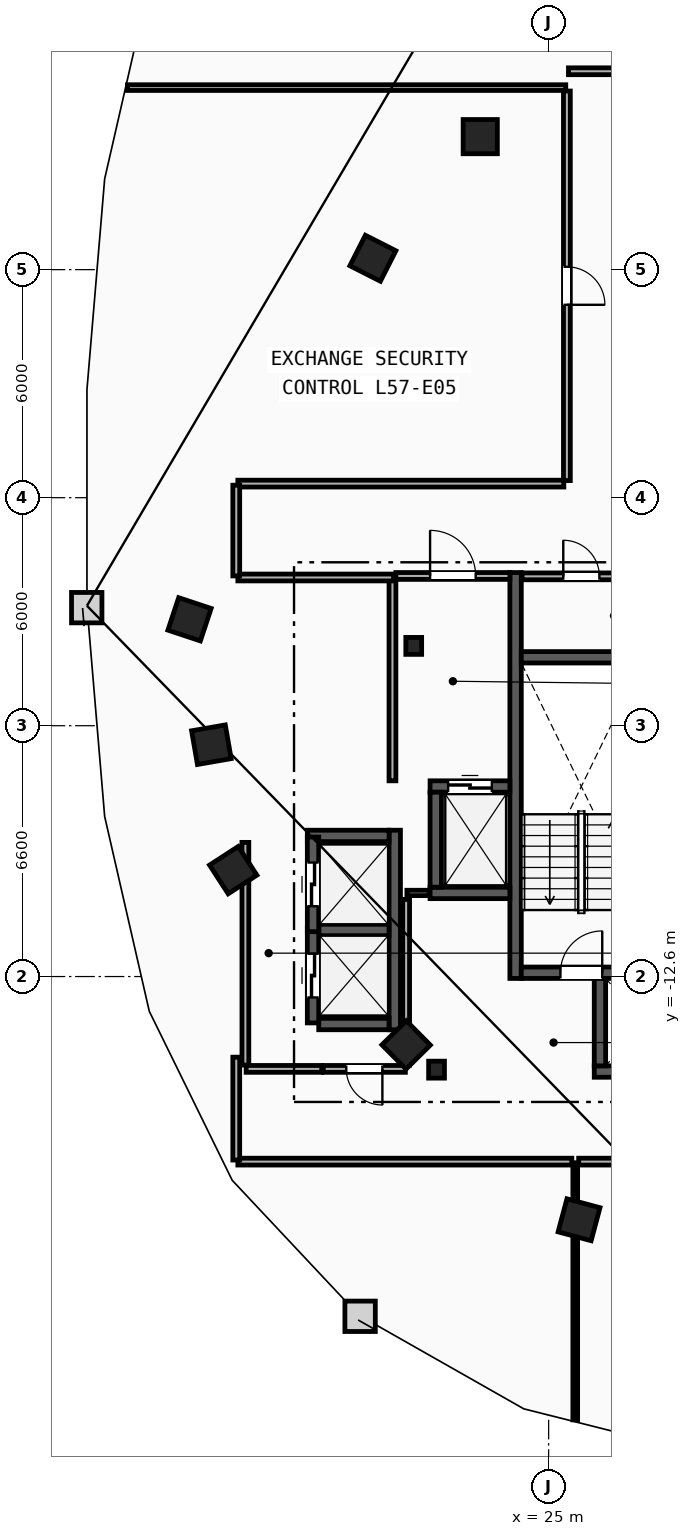
"""IFC4 building model, lengths in metres.
Left out: names, types, materials, properties, quantities, classifications, styles, units other than length and angle.
Written with IfcOpenShell. Run it as: python <this file> out.ifc"""

import sys

from ifc_helpers import new_model, si_unit, direction, frame, frame_2d, origin, origin_2d, place, context, subcontext, project, spatial, rectangle, i_section, extrude, element, fill, save


model = new_model("IFC4")
c1 = context("Model", 3, precision=1e-05, world=origin(), true_north=direction((0.0, 1.0)))
c2 = subcontext(c1, "Body", "Model", "MODEL_VIEW")
j1 = project(units=[si_unit("LENGTHUNIT", "METRE"), si_unit("PLANEANGLEUNIT", "RADIAN")], contexts=[c1])
p1 = place(None, origin())
s1 = spatial("IfcSite", under=j1, at=p1, CompositionType="ELEMENT")
p2 = place(p1, origin())
s2 = spatial("IfcBuilding", under=s1, at=p2, CompositionType="ELEMENT")
p3 = place(p2, frame((0.0, 0.0, 217.0)))
s3 = spatial("IfcBuildingStorey", under=s2, at=p3, CompositionType="ELEMENT", Elevation=217.0)
for number, where, z_axis, x_axis in (
    (1, (21.45, -3.9, 0.0), (0.0, 0.0, 1.0), (1.0, 0.0, 0.0)),
    (2, (22.05, -15.05, 0.0), (0.0, 0.0, 1.0), (1.0, 0.0, 0.0)),
):
    element("IfcColumn", number, at=place(p3, frame(where, z_axis=z_axis, x_axis=x_axis)), inside=s3, PredefinedType="COLUMN", context=c2, shape_type="SweptSolid", body=[
        extrude(i_section(OverallWidth=0.416, OverallDepth=0.446, WebThickness=0.039, FlangeThickness=0.063, FilletRadius=0.018, at=origin_2d()), origin(), (0.0, 0.0, 1.0), 3.6),
    ])
for number, where, z_axis, x_axis in (
    (3, (23.2, 9.5, 0.0), (0.0, 0.0, 1.0), (1.0, 0.0, 0.0)),
    (4, (15.55, -3.2, 0.0), (0.0, 0.0, 1.0), (-0.315, -0.949, 0.0)),
    (5, (16.125, -6.5, 0.0), (0.0, 0.0, 1.0), (0.172, -0.985, 0.0)),
    (6, (16.7, -9.8, 0.0), (0.0, 0.0, 1.0), (0.544, -0.839, 0.0)),
    (7, (21.25, -14.4, 0.0), (0.0, 0.0, 1.0), (0.703, -0.711, 0.0)),
    (8, (25.8, -19.0, 0.0), (0.0, 0.0, 1.0), (0.966, -0.259, 0.0)),
    (9, (20.375, 6.3, 0.0), (0.0, 0.0, 1.0), (-0.453, -0.892, 0.0)),
):
    element("IfcColumn", number, at=place(p3, frame(where, z_axis=z_axis, x_axis=x_axis)), inside=s3, PredefinedType="COLUMN", context=c2, shape_type="SweptSolid", body=[
        extrude(rectangle(XDim=0.9, YDim=0.9, at=origin_2d()), origin(), (0.0, 0.0, 1.0), 3.6),
    ])
p4 = place(p3, frame((24.13, -12.65, 0.0), z_axis=(0.0, 0.0, 1.0), x_axis=(0.0, 1.0, 0.0)))
e10 = element("IfcWall", 10, at=p4, inside=s3, PredefinedType="SHEAR", context=c2, shape_type="SweptSolid", body=[
    extrude(rectangle(XDim=10.68, YDim=0.3, at=frame_2d((5.34, 0.0))), origin(), (0.0, 0.0, 1.0), 3.34),
])
p5 = place(p3, frame((24.28, -12.5, 0.0), z_axis=(0.0, 0.0, 1.0), x_axis=(1.0, 0.0, 0.0)))
e11 = element("IfcWall", 11, at=p5, inside=s3, PredefinedType="SHEAR", context=c2, shape_type="SweptSolid", body=[
    extrude(rectangle(XDim=3.16, YDim=0.3, at=frame_2d((1.58, 0.0))), origin(), (0.0, 0.0, 1.0), 3.34),
])
p6 = place(p5, frame((1.03, 0.0, 0.0)))
e12 = element("IfcOpeningElement", 12, at=p6, cuts=e11, PredefinedType="OPENING", context=c2, shape_type="SweptSolid", body=[
    extrude(rectangle(XDim=1.1, YDim=2.15, at=frame_2d((0.55, 1.075))), frame((0.0, 0.16, 0.0), z_axis=(0.0, -1.0, 0.0), x_axis=(1.0, 0.0, 0.0)), (0.0, 0.0, 1.0), 0.32),
])
p7 = place(p3, frame((24.28, -4.2, 0.0), z_axis=(0.0, 0.0, 1.0), x_axis=(1.0, 0.0, 0.0)))
e13 = element("IfcWall", 13, at=p7, inside=s3, PredefinedType="SHEAR", context=c2, shape_type="SweptSolid", body=[
    extrude(rectangle(XDim=3.16, YDim=0.3, at=frame_2d((1.58, 0.0))), origin(), (0.0, 0.0, 1.0), 3.34),
])
p8 = place(p3, frame((20.89, -7.45, 0.0), z_axis=(0.0, 0.0, 1.0), x_axis=(0.0, 1.0, 0.0)))
e14 = element("IfcWall", 14, at=p8, inside=s3, PredefinedType="PARTITIONING", context=c2, shape_type="SweptSolid", body=[
    extrude(rectangle(XDim=5.3, YDim=0.18, at=frame_2d((2.65, 0.0))), origin(), (0.0, 0.0, 1.0), 3.34),
])
p9 = place(p3, frame((20.98, -2.06, 0.0), z_axis=(0.0, 0.0, 1.0), x_axis=(1.0, 0.0, 0.0)))
e15 = element("IfcWall", 15, at=p9, inside=s3, PredefinedType="PARTITIONING", context=c2, shape_type="SweptSolid", body=[
    extrude(rectangle(XDim=3.0, YDim=0.18, at=frame_2d((1.5, 0.0))), origin(), (0.0, 0.0, 1.0), 3.34),
])
p10 = place(p9, frame((0.9, 0.0, 0.0)))
e16 = element("IfcOpeningElement", 16, at=p10, cuts=e15, PredefinedType="OPENING", context=c2, shape_type="SweptSolid", body=[
    extrude(rectangle(XDim=1.2, YDim=2.15, at=frame_2d((0.6, 1.075))), frame((0.0, 0.1, 0.0), z_axis=(0.0, -1.0, 0.0), x_axis=(1.0, 0.0, 0.0)), (0.0, 0.0, 1.0), 0.2),
])
p11 = place(p3, frame((21.88, -7.6, 0.0), z_axis=(0.0, 0.0, 1.0), x_axis=(1.0, 0.0, 0.0)))
e17 = element("IfcWall", 17, at=p11, inside=s3, PredefinedType="SHEAR", context=c2, shape_type="SweptSolid", body=[
    extrude(rectangle(XDim=2.1, YDim=0.3, at=frame_2d((1.05, 0.0))), origin(), (0.0, 0.0, 1.0), 3.34),
])
p12 = place(p11, frame((0.475, 0.0, 0.0)))
e18 = element("IfcOpeningElement", 18, at=p12, cuts=e17, PredefinedType="OPENING", context=c2, shape_type="SweptSolid", body=[
    extrude(rectangle(XDim=1.15, YDim=2.2, at=frame_2d((0.575, 1.1))), frame((0.0, 0.16, 0.0), z_axis=(0.0, -1.0, 0.0), x_axis=(1.0, 0.0, 0.0)), (0.0, 0.0, 1.0), 0.32),
])
p13 = place(p3, frame((21.88, -10.4, 0.0), z_axis=(0.0, 0.0, 1.0), x_axis=(1.0, 0.0, 0.0)))
e19 = element("IfcWall", 19, at=p13, inside=s3, PredefinedType="SHEAR", context=c2, shape_type="SweptSolid", body=[
    extrude(rectangle(XDim=2.1, YDim=0.3, at=frame_2d((1.05, 0.0))), origin(), (0.0, 0.0, 1.0), 3.34),
])
for number, where, z_axis, x_axis in (
    (20, (22.03, -10.25, 0.0), (0.0, 0.0, 1.0), (0.0, 1.0, 0.0)),
    (21, (26.2, -15.1, 0.0), (0.0, 0.0, 1.0), (1.0, 0.0, 0.0)),
):
    element("IfcWall", number, at=place(p3, frame(where, z_axis=z_axis, x_axis=x_axis)), inside=s3, PredefinedType="SHEAR", context=c2, shape_type="SweptSolid", body=[
        extrude(rectangle(XDim=2.5, YDim=0.3, at=frame_2d((1.25, 0.0))), origin(), (0.0, 0.0, 1.0), 3.34),
    ])
p14 = place(p3, frame((26.35, -14.95, 0.0), z_axis=(0.0, 0.0, 1.0), x_axis=(0.0, 1.0, 0.0)))
e22 = element("IfcWall", 22, at=p14, inside=s3, PredefinedType="SHEAR", context=c2, shape_type="SweptSolid", body=[
    extrude(rectangle(XDim=2.3, YDim=0.3, at=frame_2d((1.15, 0.0))), origin(), (0.0, 0.0, 1.0), 3.34),
])
p15 = place(p3, frame((20.95, -14.0, 0.0), z_axis=(0.0, 0.0, 1.0), x_axis=(0.0, 1.0, 0.0)))
e23 = element("IfcWall", 23, at=p15, inside=s3, PredefinedType="SHEAR", context=c2, shape_type="SweptSolid", body=[
    extrude(rectangle(XDim=5.25, YDim=0.3, at=frame_2d((2.625, 0.0))), origin(), (0.0, 0.0, 1.0), 3.34),
])
p16 = place(p3, frame((18.95, -13.85, 0.0), z_axis=(0.0, 0.0, 1.0), x_axis=(1.0, 0.0, 0.0)))
e24 = element("IfcWall", 24, at=p16, inside=s3, PredefinedType="SHEAR", context=c2, shape_type="SweptSolid", body=[
    extrude(rectangle(XDim=1.85, YDim=0.3, at=frame_2d((0.925, 0.0))), origin(), (0.0, 0.0, 1.0), 3.34),
])
p17 = place(p3, frame((18.65, -8.9, 0.0), z_axis=(0.0, 0.0, 1.0), x_axis=(1.0, 0.0, 0.0)))
e25 = element("IfcWall", 25, at=p17, inside=s3, PredefinedType="SHEAR", context=c2, shape_type="SweptSolid", body=[
    extrude(rectangle(XDim=2.15, YDim=0.3, at=frame_2d((1.075, 0.0))), origin(), (0.0, 0.0, 1.0), 3.34),
])
p18 = place(p3, frame((18.95, -11.375, 0.0), z_axis=(0.0, 0.0, 1.0), x_axis=(1.0, 0.0, 0.0)))
e26 = element("IfcWall", 26, at=p18, inside=s3, PredefinedType="SHEAR", context=c2, shape_type="SweptSolid", body=[
    extrude(rectangle(XDim=1.85, YDim=0.3, at=frame_2d((0.925, 0.0))), origin(), (0.0, 0.0, 1.0), 3.34),
])
p19 = place(p3, frame((18.8, -13.82, 0.0), z_axis=(0.0, 0.0, 1.0), x_axis=(0.0, 1.0, 0.0)))
e27 = element("IfcWall", 27, at=p19, inside=s3, PredefinedType="SHEAR", context=c2, shape_type="SweptSolid", body=[
    extrude(rectangle(XDim=2.49, YDim=0.3, at=frame_2d((1.245, 0.0))), origin(), (0.0, 0.0, 1.0), 3.34),
])
p20 = place(p19, frame((0.67, 0.0, 0.0)))
e28 = element("IfcOpeningElement", 28, at=p20, cuts=e27, PredefinedType="OPENING", context=c2, shape_type="SweptSolid", body=[
    extrude(rectangle(XDim=1.15, YDim=2.2, at=frame_2d((0.575, 1.1))), frame((0.0, 0.16, 0.0), z_axis=(0.0, -1.0, 0.0), x_axis=(1.0, 0.0, 0.0)), (0.0, 0.0, 1.0), 0.32),
])
p21 = place(p3, frame((18.8, -11.42, 0.0), z_axis=(0.0, 0.0, 1.0), x_axis=(0.0, 1.0, 0.0)))
e29 = element("IfcWall", 29, at=p21, inside=s3, PredefinedType="SHEAR", context=c2, shape_type="SweptSolid", body=[
    extrude(rectangle(XDim=2.49, YDim=0.3, at=frame_2d((1.245, 0.0))), origin(), (0.0, 0.0, 1.0), 3.34),
])
p22 = place(p21, frame((0.67, 0.0, 0.0)))
e30 = element("IfcOpeningElement", 30, at=p22, cuts=e29, PredefinedType="OPENING", context=c2, shape_type="SweptSolid", body=[
    extrude(rectangle(XDim=1.15, YDim=2.2, at=frame_2d((0.575, 1.1))), frame((0.0, 0.16, 0.0), z_axis=(0.0, -1.0, 0.0), x_axis=(1.0, 0.0, 0.0)), (0.0, 0.0, 1.0), 0.32),
])
p23 = place(p3, frame((17.02, -14.93, 0.0), z_axis=(0.0, 0.0, 1.0), x_axis=(0.0, 1.0, 0.0)))
e31 = element("IfcWall", 31, at=p23, inside=s3, PredefinedType="PARTITIONING", context=c2, shape_type="SweptSolid", body=[
    extrude(rectangle(XDim=5.86, YDim=0.18, at=frame_2d((2.93, 0.0))), origin(), (0.0, 0.0, 1.0), 3.34),
])
p24 = place(p3, frame((17.04, -15.03, 0.0), z_axis=(0.0, 0.0, 1.0), x_axis=(1.0, 0.0, 0.0)))
e32 = element("IfcWall", 32, at=p24, inside=s3, PredefinedType="PARTITIONING", context=c2, shape_type="SweptSolid", body=[
    extrude(rectangle(XDim=1.99, YDim=0.18, at=frame_2d((0.995, 0.0))), origin(), (0.0, 0.0, 1.0), 3.34),
])
p25 = place(p3, frame((21.23, -15.03, 0.0), z_axis=(0.0, 0.0, 1.0), x_axis=(-1.0, 0.0, 0.0)))
e33 = element("IfcWall", 33, at=p25, inside=s3, PredefinedType="PARTITIONING", context=c2, shape_type="SweptSolid", body=[
    extrude(rectangle(XDim=2.16, YDim=0.18, at=frame_2d((1.08, 0.0))), origin(), (0.0, 0.0, 1.0), 3.34),
])
p26 = place(p25, frame((0.605, 0.0, 0.0)))
e34 = element("IfcOpeningElement", 34, at=p26, cuts=e33, PredefinedType="OPENING", context=c2, shape_type="SweptSolid", body=[
    extrude(rectangle(XDim=0.95, YDim=2.1, at=frame_2d((0.475, 1.05))), frame((0.0, 0.1, 0.0), z_axis=(0.0, -1.0, 0.0), x_axis=(1.0, 0.0, 0.0)), (0.0, 0.0, 1.0), 0.2),
])
p27 = place(p3, frame((21.27, -10.4, 0.0), z_axis=(0.0, 0.0, 1.0), x_axis=(1.0, 0.0, 0.0)))
e35 = element("IfcWall", 35, at=p27, inside=s3, PredefinedType="PARTITIONING", context=c2, shape_type="SweptSolid", body=[
    extrude(rectangle(XDim=0.59, YDim=0.14, at=frame_2d((0.295, 0.0))), origin(), (0.0, 0.0, 1.0), 3.34),
])
p28 = place(p3, frame((21.25, -14.93, 0.0), z_axis=(0.0, 0.0, 1.0), x_axis=(0.0, 1.0, 0.0)))
e36 = element("IfcWall", 36, at=p28, inside=s3, PredefinedType="PARTITIONING", context=c2, shape_type="SweptSolid", body=[
    extrude(rectangle(XDim=4.36, YDim=0.18, at=frame_2d((2.18, 0.0))), origin(), (0.0, 0.0, 1.0), 3.34),
])
p29 = place(p3, frame((24.3, -2.07, 0.0), z_axis=(0.0, 0.0, 1.0), x_axis=(1.0, 0.0, 0.0)))
e37 = element("IfcWall", 37, at=p29, inside=s3, PredefinedType="PARTITIONING", context=c2, shape_type="SweptSolid", body=[
    extrude(rectangle(XDim=3.12, YDim=0.18, at=frame_2d((1.56, 0.0))), origin(), (0.0, 0.0, 1.0), 3.34),
])
p30 = place(p29, frame((1.085, 0.0, 0.0)))
e38 = element("IfcOpeningElement", 38, at=p30, cuts=e37, PredefinedType="OPENING", context=c2, shape_type="SweptSolid", body=[
    extrude(rectangle(XDim=0.95, YDim=2.1, at=frame_2d((0.475, 1.05))), frame((0.0, 0.1, 0.0), z_axis=(0.0, -1.0, 0.0), x_axis=(1.0, 0.0, 0.0)), (0.0, 0.0, 1.0), 0.2),
])
p31 = place(p3, frame((13.918, 10.79, 0.0), z_axis=(0.0, 0.0, 1.0), x_axis=(1.0, 0.0, 0.0)))
e39 = element("IfcWall", 39, at=p31, inside=s3, PredefinedType="PARTITIONING", context=c2, shape_type="SweptSolid", body=[
    extrude(rectangle(XDim=11.532, YDim=0.15, at=frame_2d((5.766, 0.0))), origin(), (0.0, 0.0, 1.0), 3.34),
])
p32 = place(p3, frame((25.7, -24.265, 0.0), z_axis=(0.0, 0.0, 1.0), x_axis=(0.0, 1.0, 0.0)))
e40 = element("IfcWall", 40, at=p32, inside=s3, PredefinedType="PARTITIONING", context=c2, shape_type="SweptSolid", body=[
    extrude(rectangle(XDim=6.765, YDim=0.125, at=frame_2d((3.382, 0.0))), origin(), (0.0, 0.0, 1.0), 3.34),
])
p33 = place(p3, frame((25.79, -17.47, 0.0), z_axis=(0.0, 0.0, 1.0), x_axis=(1.0, 0.0, 0.0)))
e41 = element("IfcWall", 41, at=p33, inside=s3, PredefinedType="PARTITIONING", context=c2, shape_type="SweptSolid", body=[
    extrude(rectangle(XDim=7.82, YDim=0.18, at=frame_2d((3.91, 0.0))), origin(), (0.0, 0.0, 1.0), 3.34),
])
p34 = place(p33, frame((3.41, 0.0, 0.0)))
e42 = element("IfcOpeningElement", 42, at=p34, cuts=e41, PredefinedType="OPENING", context=c2, shape_type="SweptSolid", body=[
    extrude(rectangle(XDim=1.0, YDim=2.15, at=frame_2d((0.5, 1.075))), frame((0.0, 0.1, 0.0), z_axis=(0.0, -1.0, 0.0), x_axis=(1.0, 0.0, 0.0)), (0.0, 0.0, 1.0), 0.2),
])
p35 = place(p3, frame((25.48, 10.7, 0.0), z_axis=(0.0, 0.0, 1.0), x_axis=(0.0, -1.0, 0.0)))
e43 = element("IfcWall", 43, at=p35, inside=s3, PredefinedType="PARTITIONING", context=c2, shape_type="SweptSolid", body=[
    extrude(rectangle(XDim=10.25, YDim=0.18, at=frame_2d((5.125, 0.0))), origin(), (0.0, 0.0, 1.0), 3.34),
])
p36 = place(p35, frame((4.625, 0.0, 0.0)))
e44 = element("IfcOpeningElement", 44, at=p36, cuts=e43, PredefinedType="OPENING", context=c2, shape_type="SweptSolid", body=[
    extrude(rectangle(XDim=1.0, YDim=2.15, at=frame_2d((0.5, 1.075))), frame((0.0, 0.1, 0.0), z_axis=(0.0, -1.0, 0.0), x_axis=(1.0, 0.0, 0.0)), (0.0, 0.0, 1.0), 0.2),
])
p37 = place(p3, frame((16.822, -17.47, 0.0), z_axis=(0.0, 0.0, 1.0), x_axis=(1.0, 0.0, 0.0)))
e45 = element("IfcWall", 45, at=p37, inside=s3, PredefinedType="PARTITIONING", context=c2, shape_type="SweptSolid", body=[
    extrude(rectangle(XDim=8.789, YDim=0.18, at=frame_2d((4.394, 0.0))), origin(), (0.0, 0.0, 1.0), 3.34),
])
p38 = place(p3, frame((25.4, 0.37, 0.0), z_axis=(0.0, 0.0, 1.0), x_axis=(-1.0, 0.0, 0.0)))
e46 = element("IfcWall", 46, at=p38, inside=s3, PredefinedType="PARTITIONING", context=c2, shape_type="SweptSolid", body=[
    extrude(rectangle(XDim=8.578, YDim=0.18, at=frame_2d((4.289, 0.0))), origin(), (0.0, 0.0, 1.0), 3.34),
])
p39 = place(p3, frame((16.822, -2.1, 0.0), z_axis=(0.0, 0.0, 1.0), x_axis=(1.0, 0.0, 0.0)))
e47 = element("IfcWall", 47, at=p39, inside=s3, PredefinedType="PARTITIONING", context=c2, shape_type="SweptSolid", body=[
    extrude(rectangle(XDim=4.098, YDim=0.18, at=frame_2d((2.049, 0.0))), origin(), (0.0, 0.0, 1.0), 3.34),
])
p40 = place(p3, frame((16.78, -14.721, 0.0), z_axis=(0.0, 0.0, 1.0), x_axis=(0.0, -1.0, 0.0)))
e48 = element("IfcWall", 48, at=p40, inside=s3, PredefinedType="PARTITIONING", context=c2, shape_type="SweptSolid", body=[
    extrude(rectangle(XDim=2.707, YDim=0.18, at=frame_2d((1.354, 0.0))), origin(), (0.0, 0.0, 1.0), 3.34),
])
p41 = place(p3, frame((16.78, 0.329, 0.0), z_axis=(0.0, 0.0, 1.0), x_axis=(0.0, -1.0, 0.0)))
e49 = element("IfcWall", 49, at=p41, inside=s3, PredefinedType="PARTITIONING", context=c2, shape_type="SweptSolid", body=[
    extrude(rectangle(XDim=2.387, YDim=0.18, at=frame_2d((1.194, 0.0))), origin(), (0.0, 0.0, 1.0), 3.34),
])
p42 = place(p3, frame((27.878, 11.22, 0.0), z_axis=(0.0, 0.0, 1.0), x_axis=(-1.0, 0.0, 0.0)))
e50 = element("IfcWall", 50, at=p42, inside=s3, PredefinedType="PARTITIONING", context=c2, shape_type="SweptSolid", body=[
    extrude(rectangle(XDim=2.357, YDim=0.18, at=frame_2d((1.178, 0.0))), origin(), (0.0, 0.0, 1.0), 3.34),
])
p43 = place(p6, origin())
e51 = element("IfcDoor", 51, at=p43, inside=s3, OperationType="SINGLE_SWING_RIGHT", PredefinedType="DOOR", context=c2, shape_type="SweptSolid", body=[
    extrude(rectangle(XDim=1.1, YDim=2.15, at=frame_2d((0.55, 1.075))), frame((0.0, 0.025, 0.0), z_axis=(0.0, -1.0, 0.0), x_axis=(1.0, 0.0, 0.0)), (0.0, 0.0, 1.0), 0.05),
])
fill(e12, e51)
p44 = place(p10, origin())
e52 = element("IfcDoor", 52, at=p44, inside=s3, OperationType="SINGLE_SWING_LEFT", PredefinedType="DOOR", context=c2, shape_type="SweptSolid", body=[
    extrude(rectangle(XDim=1.2, YDim=2.15, at=frame_2d((0.6, 1.075))), frame((0.0, 0.025, 0.0), z_axis=(0.0, -1.0, 0.0), x_axis=(1.0, 0.0, 0.0)), (0.0, 0.0, 1.0), 0.05),
])
fill(e16, e52)
p45 = place(p12, origin())
e53 = element("IfcDoor", 53, at=p45, inside=s3, OperationType="SLIDING_TO_LEFT", PredefinedType="TRAPDOOR", context=c2, shape_type="SweptSolid", body=[
    extrude(rectangle(XDim=1.15, YDim=2.2, at=frame_2d((0.575, 1.1))), frame((0.0, 0.025, 0.0), z_axis=(0.0, -1.0, 0.0), x_axis=(1.0, 0.0, 0.0)), (0.0, 0.0, 1.0), 0.05),
])
fill(e18, e53)
p46 = place(p20, origin())
e54 = element("IfcDoor", 54, at=p46, inside=s3, OperationType="SLIDING_TO_LEFT", PredefinedType="TRAPDOOR", context=c2, shape_type="SweptSolid", body=[
    extrude(rectangle(XDim=1.15, YDim=2.2, at=frame_2d((0.575, 1.1))), frame((0.0, 0.025, 0.0), z_axis=(0.0, -1.0, 0.0), x_axis=(1.0, 0.0, 0.0)), (0.0, 0.0, 1.0), 0.05),
])
fill(e28, e54)
p47 = place(p22, origin())
e55 = element("IfcDoor", 55, at=p47, inside=s3, OperationType="SLIDING_TO_LEFT", PredefinedType="TRAPDOOR", context=c2, shape_type="SweptSolid", body=[
    extrude(rectangle(XDim=1.15, YDim=2.2, at=frame_2d((0.575, 1.1))), frame((0.0, 0.025, 0.0), z_axis=(0.0, -1.0, 0.0), x_axis=(1.0, 0.0, 0.0)), (0.0, 0.0, 1.0), 0.05),
])
fill(e30, e55)
p48 = place(p36, origin())
e56 = element("IfcDoor", 56, at=p48, inside=s3, OperationType="SINGLE_SWING_RIGHT", PredefinedType="DOOR", context=c2, shape_type="SweptSolid", body=[
    extrude(rectangle(XDim=1.0, YDim=2.15, at=frame_2d((0.5, 1.075))), frame((0.0, 0.025, 0.0), z_axis=(0.0, -1.0, 0.0), x_axis=(1.0, 0.0, 0.0)), (0.0, 0.0, 1.0), 0.05),
])
fill(e44, e56)
p49 = place(p30, origin())
e57 = element("IfcDoor", 57, at=p49, inside=s3, OperationType="SINGLE_SWING_LEFT", PredefinedType="DOOR", context=c2, shape_type="SweptSolid", body=[
    extrude(rectangle(XDim=0.95, YDim=2.1, at=frame_2d((0.475, 1.05))), frame((0.0, 0.025, 0.0), z_axis=(0.0, -1.0, 0.0), x_axis=(1.0, 0.0, 0.0)), (0.0, 0.0, 1.0), 0.05),
])
fill(e38, e57)
p50 = place(p26, origin())
e58 = element("IfcDoor", 58, at=p50, inside=s3, OperationType="SINGLE_SWING_LEFT", PredefinedType="DOOR", context=c2, shape_type="SweptSolid", body=[
    extrude(rectangle(XDim=0.95, YDim=2.1, at=frame_2d((0.475, 1.05))), frame((0.0, 0.025, 0.0), z_axis=(0.0, -1.0, 0.0), x_axis=(1.0, 0.0, 0.0)), (0.0, 0.0, 1.0), 0.05),
])
fill(e34, e58)
save(model, sys.argv[1])
